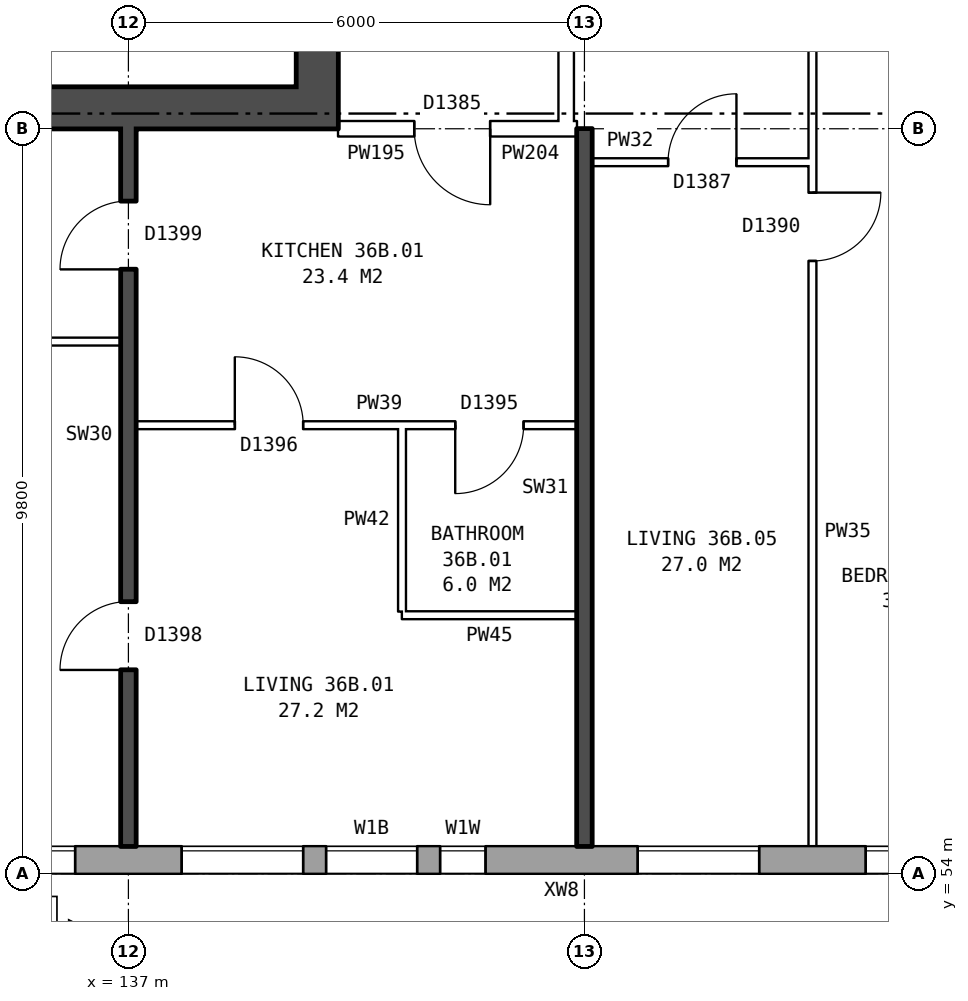
"""IFC4 building model, lengths in metres.
Left out: names, types, materials, properties, quantities, classifications, styles, units other than length and angle.
Written with IfcOpenShell. Run it as: python <this file> out.ifc"""

import sys

from ifc_helpers import new_model, si_unit, direction, frame, frame_2d, origin, place, context, subcontext, project, spatial, rectangle, extrude, element, fill, save


model = new_model("IFC4")
c1 = context("Model", 3, precision=1e-05, world=origin(), true_north=direction((0.0, 1.0)))
c2 = subcontext(c1, "Body", "Model", "MODEL_VIEW")
j1 = project(units=[si_unit("LENGTHUNIT", "METRE"), si_unit("PLANEANGLEUNIT", "RADIAN")], contexts=[c1])
p1 = place(None, origin())
s1 = spatial("IfcSite", under=j1, at=p1, CompositionType="ELEMENT")
p2 = place(p1, origin())
s2 = spatial("IfcBuilding", under=s1, at=p2, CompositionType="ELEMENT")
p3 = place(p2, frame((0.0, 0.0, 129.9)))
s3 = spatial("IfcBuildingStorey", under=s2, at=p3, CompositionType="ELEMENT", Elevation=129.9)
p4 = place(p3, frame((134.075, 54.18, 0.0), z_axis=(0.0, 0.0, 1.0), x_axis=(1.0, 0.0, 0.0)))
e1 = element("IfcWall", 1, at=p4, inside=s3, PredefinedType="STANDARD", context=c2, shape_type="SweptSolid", body=[
    extrude(rectangle(XDim=35.601, YDim=0.36, at=frame_2d((17.8, 0.0))), origin(), (0.0, 0.0, 1.0), 2.85),
])
p5 = place(p4, frame((0.625, 0.0, 0.8)))
e2 = element("IfcOpeningElement", 2, at=p5, cuts=e1, PredefinedType="OPENING", context=c2, shape_type="SweptSolid", body=[
    extrude(rectangle(XDim=1.6, YDim=1.8, at=frame_2d((0.8, 0.9))), frame((0.0, 0.19, 0.0), z_axis=(0.0, -1.0, 0.0), x_axis=(1.0, 0.0, 0.0)), (0.0, 0.0, 1.0), 0.38),
])
p6 = place(p4, frame((3.625, 0.0, 0.8)))
e3 = element("IfcOpeningElement", 3, at=p6, cuts=e1, PredefinedType="OPENING", context=c2, shape_type="SweptSolid", body=[
    extrude(rectangle(XDim=1.6, YDim=1.8, at=frame_2d((0.8, 0.9))), frame((0.0, 0.19, 0.0), z_axis=(0.0, -1.0, 0.0), x_axis=(1.0, 0.0, 0.0)), (0.0, 0.0, 1.0), 0.38),
])
p7 = place(p4, frame((5.525, 0.0, 0.8)))
e4 = element("IfcOpeningElement", 4, at=p7, cuts=e1, PredefinedType="OPENING", context=c2, shape_type="SweptSolid", body=[
    extrude(rectangle(XDim=1.2, YDim=1.8, at=frame_2d((0.6, 0.9))), frame((0.0, 0.19, 0.0), z_axis=(0.0, -1.0, 0.0), x_axis=(1.0, 0.0, 0.0)), (0.0, 0.0, 1.0), 0.38),
])
p8 = place(p4, frame((9.625, 0.0, 0.8)))
e5 = element("IfcOpeningElement", 5, at=p8, cuts=e1, PredefinedType="OPENING", context=c2, shape_type="SweptSolid", body=[
    extrude(rectangle(XDim=1.6, YDim=1.8, at=frame_2d((0.8, 0.9))), frame((0.0, 0.19, 0.0), z_axis=(0.0, -1.0, 0.0), x_axis=(1.0, 0.0, 0.0)), (0.0, 0.0, 1.0), 0.38),
])
p9 = place(p4, frame((12.625, 0.0, 0.8)))
e6 = element("IfcOpeningElement", 6, at=p9, cuts=e1, PredefinedType="OPENING", context=c2, shape_type="SweptSolid", body=[
    extrude(rectangle(XDim=1.6, YDim=1.8, at=frame_2d((0.8, 0.9))), frame((0.0, 0.19, 0.0), z_axis=(0.0, -1.0, 0.0), x_axis=(1.0, 0.0, 0.0)), (0.0, 0.0, 1.0), 0.38),
])
p10 = place(p4, frame((15.625, 0.0, 0.8)))
e7 = element("IfcOpeningElement", 7, at=p10, cuts=e1, PredefinedType="OPENING", context=c2, shape_type="SweptSolid", body=[
    extrude(rectangle(XDim=1.6, YDim=1.8, at=frame_2d((0.8, 0.9))), frame((0.0, 0.19, 0.0), z_axis=(0.0, -1.0, 0.0), x_axis=(1.0, 0.0, 0.0)), (0.0, 0.0, 1.0), 0.38),
])
p11 = place(p4, frame((18.625, 0.0, 0.8)))
e8 = element("IfcOpeningElement", 8, at=p11, cuts=e1, PredefinedType="OPENING", context=c2, shape_type="SweptSolid", body=[
    extrude(rectangle(XDim=1.6, YDim=1.8, at=frame_2d((0.8, 0.9))), frame((0.0, 0.19, 0.0), z_axis=(0.0, -1.0, 0.0), x_axis=(1.0, 0.0, 0.0)), (0.0, 0.0, 1.0), 0.38),
])
p12 = place(p4, frame((21.625, 0.0, 0.8)))
e9 = element("IfcOpeningElement", 9, at=p12, cuts=e1, PredefinedType="OPENING", context=c2, shape_type="SweptSolid", body=[
    extrude(rectangle(XDim=1.6, YDim=1.8, at=frame_2d((0.8, 0.9))), frame((0.0, 0.19, 0.0), z_axis=(0.0, -1.0, 0.0), x_axis=(1.0, 0.0, 0.0)), (0.0, 0.0, 1.0), 0.38),
])
p13 = place(p4, frame((24.625, 0.0, 0.8)))
e10 = element("IfcOpeningElement", 10, at=p13, cuts=e1, PredefinedType="OPENING", context=c2, shape_type="SweptSolid", body=[
    extrude(rectangle(XDim=1.6, YDim=1.8, at=frame_2d((0.8, 0.9))), frame((0.0, 0.19, 0.0), z_axis=(0.0, -1.0, 0.0), x_axis=(1.0, 0.0, 0.0)), (0.0, 0.0, 1.0), 0.38),
])
p14 = place(p4, frame((27.825, 0.0, 1.7)))
e11 = element("IfcOpeningElement", 11, at=p14, cuts=e1, PredefinedType="OPENING", context=c2, shape_type="SweptSolid", body=[
    extrude(rectangle(XDim=0.6, YDim=0.9, at=frame_2d((0.3, 0.45))), frame((0.0, 0.19, 0.0), z_axis=(0.0, -1.0, 0.0), x_axis=(1.0, 0.0, 0.0)), (0.0, 0.0, 1.0), 0.38),
])
p15 = place(p4, frame((30.625, 0.0, 0.8)))
e12 = element("IfcOpeningElement", 12, at=p15, cuts=e1, PredefinedType="OPENING", context=c2, shape_type="SweptSolid", body=[
    extrude(rectangle(XDim=1.6, YDim=1.8, at=frame_2d((0.8, 0.9))), frame((0.0, 0.19, 0.0), z_axis=(0.0, -1.0, 0.0), x_axis=(1.0, 0.0, 0.0)), (0.0, 0.0, 1.0), 0.38),
])
p16 = place(p4, frame((33.625, 0.0, 0.8)))
e13 = element("IfcOpeningElement", 13, at=p16, cuts=e1, PredefinedType="OPENING", context=c2, shape_type="SweptSolid", body=[
    extrude(rectangle(XDim=1.6, YDim=1.8, at=frame_2d((0.8, 0.9))), frame((0.0, 0.19, 0.0), z_axis=(0.0, -1.0, 0.0), x_axis=(1.0, 0.0, 0.0)), (0.0, 0.0, 1.0), 0.38),
])
p17 = place(p4, frame((7.025, 0.0, 1.6)))
e14 = element("IfcOpeningElement", 14, at=p17, cuts=e1, PredefinedType="OPENING", context=c2, shape_type="SweptSolid", body=[
    extrude(rectangle(XDim=0.6, YDim=0.9, at=frame_2d((0.3, 0.45))), frame((0.0, 0.19, 0.0), z_axis=(0.0, -1.0, 0.0), x_axis=(1.0, 0.0, 0.0)), (0.0, 0.0, 1.0), 0.38),
])
p18 = place(p4, frame((28.725, 0.0, 0.8)))
e15 = element("IfcOpeningElement", 15, at=p18, cuts=e1, PredefinedType="OPENING", context=c2, shape_type="SweptSolid", body=[
    extrude(rectangle(XDim=1.6, YDim=1.8, at=frame_2d((0.8, 0.9))), frame((0.0, 0.19, 0.0), z_axis=(0.0, -1.0, 0.0), x_axis=(1.0, 0.0, 0.0)), (0.0, 0.0, 1.0), 0.38),
])
p19 = place(p3, frame((139.485, 63.8, 0.0), z_axis=(0.0, 0.0, 1.0), x_axis=(0.0, 1.0, 0.0)))
e16 = element("IfcWall", 16, at=p19, inside=s3, PredefinedType="SHEAR", context=c2, shape_type="SweptSolid", body=[
    extrude(rectangle(XDim=12.4, YDim=0.55, at=frame_2d((6.2, 0.0))), origin(), (0.0, 0.0, 1.0), 2.85),
])
p20 = place(p19, frame((1.325, 0.0, 0.0)))
e17 = element("IfcOpeningElement", 17, at=p20, cuts=e16, PredefinedType="OPENING", context=c2, shape_type="SweptSolid", body=[
    extrude(rectangle(XDim=1.1, YDim=2.1, at=frame_2d((0.55, 1.05))), frame((0.0, 0.285, 0.0), z_axis=(0.0, -1.0, 0.0), x_axis=(1.0, 0.0, 0.0)), (0.0, 0.0, 1.0), 0.57),
])
p21 = place(p19, frame((3.6, 0.0, 0.0)))
e18 = element("IfcOpeningElement", 18, at=p21, cuts=e16, PredefinedType="OPENING", context=c2, shape_type="SweptSolid", body=[
    extrude(rectangle(XDim=1.1, YDim=2.1, at=frame_2d((0.55, 1.05))), frame((0.0, 0.285, 0.0), z_axis=(0.0, -1.0, 0.0), x_axis=(1.0, 0.0, 0.0)), (0.0, 0.0, 1.0), 0.57),
])
p22 = place(p19, frame((5.8, 0.0, 0.0)))
e19 = element("IfcOpeningElement", 19, at=p22, cuts=e16, PredefinedType="OPENING", context=c2, shape_type="SweptSolid", body=[
    extrude(rectangle(XDim=1.1, YDim=2.1, at=frame_2d((0.55, 1.05))), frame((0.0, 0.285, 0.0), z_axis=(0.0, -1.0, 0.0), x_axis=(1.0, 0.0, 0.0)), (0.0, 0.0, 1.0), 0.57),
])
p23 = place(p19, frame((9.9, 0.0, 0.0)))
e20 = element("IfcOpeningElement", 20, at=p23, cuts=e16, PredefinedType="OPENING", context=c2, shape_type="SweptSolid", body=[
    extrude(rectangle(XDim=1.1, YDim=2.1, at=frame_2d((0.55, 1.05))), frame((0.0, 0.285, 0.0), z_axis=(0.0, -1.0, 0.0), x_axis=(1.0, 0.0, 0.0)), (0.0, 0.0, 1.0), 0.57),
])
p24 = place(p19, frame((8.125, 0.0, 0.0)))
e21 = element("IfcOpeningElement", 21, at=p24, cuts=e16, PredefinedType="OPENING", context=c2, shape_type="SweptSolid", body=[
    extrude(rectangle(XDim=0.85, YDim=2.1, at=frame_2d((0.425, 1.05))), frame((0.0, 0.285, 0.0), z_axis=(0.0, -1.0, 0.0), x_axis=(1.0, 0.0, 0.0)), (0.0, 0.0, 1.0), 0.57),
])
p25 = place(p3, frame((139.21, 64.075, 0.0), z_axis=(0.0, 0.0, 1.0), x_axis=(-1.0, 0.0, 0.0)))
e22 = element("IfcWall", 22, at=p25, inside=s3, PredefinedType="SHEAR", context=c2, shape_type="SweptSolid", body=[
    extrude(rectangle(XDim=7.3, YDim=0.55, at=frame_2d((3.65, 0.0))), origin(), (0.0, 0.0, 1.0), 2.85),
])
p26 = place(p3, frame((142.76, 63.9, 0.0), z_axis=(0.0, 0.0, 1.0), x_axis=(0.0, 1.0, 0.0)))
e23 = element("IfcWall", 23, at=p26, inside=s3, PredefinedType="PARTITIONING", context=c2, shape_type="SweptSolid", body=[
    extrude(rectangle(XDim=12.2, YDim=0.2, at=frame_2d((6.1, 0.0))), origin(), (0.0, 0.0, 1.0), 2.85),
])
p27 = place(p26, frame((5.1, 0.0, 0.0)))
e24 = element("IfcOpeningElement", 24, at=p27, cuts=e23, PredefinedType="OPENING", context=c2, shape_type="SweptSolid", body=[
    extrude(rectangle(XDim=2.0, YDim=2.1, at=frame_2d((1.0, 1.05))), frame((0.0, 0.11, 0.0), z_axis=(0.0, -1.0, 0.0), x_axis=(1.0, 0.0, 0.0)), (0.0, 0.0, 1.0), 0.22),
])
p28 = place(p3, frame((140.6, 57.4, 0.0), z_axis=(0.0, 0.0, 1.0), x_axis=(1.0, 0.0, 0.0)))
e25 = element("IfcWall", 25, at=p28, inside=s3, PredefinedType="PARTITIONING", context=c2, shape_type="SweptSolid", body=[
    extrude(rectangle(XDim=2.3, YDim=0.1, at=frame_2d((1.15, 0.0))), origin(), (0.0, 0.0, 1.0), 2.85),
])
p29 = place(p3, frame((137.1, 59.9, 0.0), z_axis=(0.0, 0.0, 1.0), x_axis=(1.0, 0.0, 0.0)))
e26 = element("IfcWall", 26, at=p29, inside=s3, PredefinedType="PARTITIONING", context=c2, shape_type="SweptSolid", body=[
    extrude(rectangle(XDim=5.8, YDim=0.1, at=frame_2d((2.9, 0.0))), origin(), (0.0, 0.0, 1.0), 2.85),
])
p30 = place(p29, frame((1.3, 0.0, 0.0)))
e27 = element("IfcOpeningElement", 27, at=p30, cuts=e26, PredefinedType="OPENING", context=c2, shape_type="SweptSolid", body=[
    extrude(rectangle(XDim=0.9, YDim=2.1, at=frame_2d((0.45, 1.05))), frame((0.0, 0.06, 0.0), z_axis=(0.0, -1.0, 0.0), x_axis=(1.0, 0.0, 0.0)), (0.0, 0.0, 1.0), 0.12),
])
p31 = place(p29, frame((4.2, 0.0, 0.0)))
e28 = element("IfcOpeningElement", 28, at=p31, cuts=e26, PredefinedType="OPENING", context=c2, shape_type="SweptSolid", body=[
    extrude(rectangle(XDim=0.9, YDim=2.1, at=frame_2d((0.45, 1.05))), frame((0.0, 0.06, 0.0), z_axis=(0.0, -1.0, 0.0), x_axis=(1.0, 0.0, 0.0)), (0.0, 0.0, 1.0), 0.12),
])
p32 = place(p3, frame((131.36, 61.0, 0.0), z_axis=(0.0, 0.0, 1.0), x_axis=(1.0, 0.0, 0.0)))
e29 = element("IfcWall", 29, at=p32, inside=s3, PredefinedType="PARTITIONING", context=c2, shape_type="SweptSolid", body=[
    extrude(rectangle(XDim=5.54, YDim=0.1, at=frame_2d((2.77, 0.0))), origin(), (0.0, 0.0, 1.0), 2.85),
])
p33 = place(p3, frame((143.1, 63.36, 0.0), z_axis=(0.0, 0.0, 1.0), x_axis=(1.0, 0.0, 0.0)))
e30 = element("IfcWall", 30, at=p33, inside=s3, PredefinedType="PARTITIONING", context=c2, shape_type="SweptSolid", body=[
    extrude(rectangle(XDim=2.9, YDim=0.1, at=frame_2d((1.45, 0.0))), origin(), (0.0, 0.0, 1.0), 2.85),
])
p34 = place(p33, frame((1.0, 0.0, 0.0)))
e31 = element("IfcOpeningElement", 31, at=p34, cuts=e30, PredefinedType="OPENING", context=c2, shape_type="SweptSolid", body=[
    extrude(rectangle(XDim=0.9, YDim=2.1, at=frame_2d((0.45, 1.05))), frame((0.0, 0.06, 0.0), z_axis=(0.0, -1.0, 0.0), x_axis=(1.0, 0.0, 0.0)), (0.0, 0.0, 1.0), 0.12),
])
p35 = place(p3, frame((139.76, 63.8, 0.0), z_axis=(0.0, 0.0, 1.0), x_axis=(1.0, 0.0, 0.0)))
e32 = element("IfcWall", 32, at=p35, inside=s3, PredefinedType="PARTITIONING", context=c2, shape_type="SweptSolid", body=[
    extrude(rectangle(XDim=3.0, YDim=0.2, at=frame_2d((1.5, 0.0))), origin(), (0.0, 0.0, 1.0), 2.85),
])
p36 = place(p35, frame((1.0, 0.0, 0.0)))
e33 = element("IfcOpeningElement", 33, at=p36, cuts=e32, PredefinedType="OPENING", context=c2, shape_type="SweptSolid", body=[
    extrude(rectangle(XDim=1.0, YDim=2.1, at=frame_2d((0.5, 1.05))), frame((0.0, 0.11, 0.0), z_axis=(0.0, -1.0, 0.0), x_axis=(1.0, 0.0, 0.0)), (0.0, 0.0, 1.0), 0.22),
])
p37 = place(p3, frame((142.76, 63.8, 0.0), z_axis=(0.0, 0.0, 1.0), x_axis=(1.0, 0.0, 0.0)))
e34 = element("IfcWall", 34, at=p37, inside=s3, PredefinedType="PARTITIONING", context=c2, shape_type="SweptSolid", body=[
    extrude(rectangle(XDim=0.14, YDim=0.2, at=frame_2d((0.07, 0.0))), origin(), (0.0, 0.0, 1.0), 2.85),
])
p38 = place(p3, frame((137.0, 54.36, 0.0), z_axis=(0.0, 0.0, 1.0), x_axis=(0.0, 1.0, 0.0)))
e35 = element("IfcWall", 35, at=p38, inside=s3, PredefinedType="SOLIDWALL", context=c2, shape_type="SweptSolid", body=[
    extrude(rectangle(XDim=9.44, YDim=0.2, at=frame_2d((4.72, 0.0))), origin(), (0.0, 0.0, 1.0), 2.85),
])
p39 = place(p38, frame((2.32, 0.0, 0.0)))
e36 = element("IfcOpeningElement", 36, at=p39, cuts=e35, PredefinedType="OPENING", context=c2, shape_type="SweptSolid", body=[
    extrude(rectangle(XDim=0.9, YDim=2.1, at=frame_2d((0.45, 1.05))), frame((0.0, 0.11, 0.0), z_axis=(0.0, -1.0, 0.0), x_axis=(1.0, 0.0, 0.0)), (0.0, 0.0, 1.0), 0.22),
])
p40 = place(p38, frame((7.59, 0.0, 0.0)))
e37 = element("IfcOpeningElement", 37, at=p40, cuts=e35, PredefinedType="OPENING", context=c2, shape_type="SweptSolid", body=[
    extrude(rectangle(XDim=0.9, YDim=2.1, at=frame_2d((0.45, 1.05))), frame((0.0, 0.11, 0.0), z_axis=(0.0, -1.0, 0.0), x_axis=(1.0, 0.0, 0.0)), (0.0, 0.0, 1.0), 0.22),
])
p41 = place(p3, frame((140.6, 57.45, 0.0), z_axis=(0.0, 0.0, 1.0), x_axis=(0.0, 1.0, 0.0)))
e38 = element("IfcWall", 38, at=p41, inside=s3, PredefinedType="PARTITIONING", context=c2, shape_type="SweptSolid", body=[
    extrude(rectangle(XDim=2.4, YDim=0.1, at=frame_2d((1.2, 0.0))), origin(), (0.0, 0.0, 1.0), 2.85),
])
p42 = place(p3, frame((143.0, 54.36, 0.0), z_axis=(0.0, 0.0, 1.0), x_axis=(0.0, 1.0, 0.0)))
e39 = element("IfcWall", 39, at=p42, inside=s3, PredefinedType="SOLIDWALL", context=c2, shape_type="SweptSolid", body=[
    extrude(rectangle(XDim=9.44, YDim=0.2, at=frame_2d((4.72, 0.0))), origin(), (0.0, 0.0, 1.0), 2.85),
])
p43 = place(p3, frame((146.0, 54.36, 0.0), z_axis=(0.0, 0.0, 1.0), x_axis=(0.0, 1.0, 0.0)))
e40 = element("IfcWall", 40, at=p43, inside=s3, PredefinedType="PARTITIONING", context=c2, shape_type="SweptSolid", body=[
    extrude(rectangle(XDim=14.34, YDim=0.1, at=frame_2d((7.17, 0.0))), origin(), (0.0, 0.0, 1.0), 2.85),
])
p44 = place(p43, frame((7.7, 0.0, 0.0)))
e41 = element("IfcOpeningElement", 41, at=p44, cuts=e40, PredefinedType="OPENING", context=c2, shape_type="SweptSolid", body=[
    extrude(rectangle(XDim=0.9, YDim=2.1, at=frame_2d((0.45, 1.05))), frame((0.0, 0.06, 0.0), z_axis=(0.0, -1.0, 0.0), x_axis=(1.0, 0.0, 0.0)), (0.0, 0.0, 1.0), 0.12),
])
p45 = place(p43, frame((13.04, 0.0, 0.0)))
e42 = element("IfcOpeningElement", 42, at=p45, cuts=e40, PredefinedType="OPENING", context=c2, shape_type="SweptSolid", body=[
    extrude(rectangle(XDim=0.9, YDim=2.1, at=frame_2d((0.45, 1.05))), frame((0.0, 0.06, 0.0), z_axis=(0.0, -1.0, 0.0), x_axis=(1.0, 0.0, 0.0)), (0.0, 0.0, 1.0), 0.12),
])
p46 = place(p5, origin())
e43 = element("IfcWindow", 43, at=p46, inside=s3, PartitioningType="SINGLE_PANEL", PredefinedType="WINDOW", context=c2, shape_type="SweptSolid", body=[
    extrude(rectangle(XDim=1.6, YDim=1.8, at=frame_2d((0.8, 0.9))), frame((0.0, 0.15, 0.0), z_axis=(0.0, -1.0, 0.0), x_axis=(1.0, 0.0, 0.0)), (0.0, 0.0, 1.0), 0.06),
])
fill(e2, e43)
p47 = place(p6, origin())
e44 = element("IfcWindow", 44, at=p47, inside=s3, PartitioningType="SINGLE_PANEL", PredefinedType="WINDOW", context=c2, shape_type="SweptSolid", body=[
    extrude(rectangle(XDim=1.6, YDim=1.8, at=frame_2d((0.8, 0.9))), frame((0.0, 0.15, 0.0), z_axis=(0.0, -1.0, 0.0), x_axis=(1.0, 0.0, 0.0)), (0.0, 0.0, 1.0), 0.06),
])
fill(e3, e44)
p48 = place(p7, origin())
e45 = element("IfcWindow", 45, at=p48, inside=s3, PartitioningType="SINGLE_PANEL", PredefinedType="WINDOW", context=c2, shape_type="SweptSolid", body=[
    extrude(rectangle(XDim=1.2, YDim=1.8, at=frame_2d((0.6, 0.9))), frame((0.0, 0.15, 0.0), z_axis=(0.0, -1.0, 0.0), x_axis=(1.0, 0.0, 0.0)), (0.0, 0.0, 1.0), 0.06),
])
fill(e4, e45)
p49 = place(p8, origin())
e46 = element("IfcWindow", 46, at=p49, inside=s3, PartitioningType="SINGLE_PANEL", PredefinedType="WINDOW", context=c2, shape_type="SweptSolid", body=[
    extrude(rectangle(XDim=1.6, YDim=1.8, at=frame_2d((0.8, 0.9))), frame((0.0, 0.15, 0.0), z_axis=(0.0, -1.0, 0.0), x_axis=(1.0, 0.0, 0.0)), (0.0, 0.0, 1.0), 0.06),
])
fill(e5, e46)
p50 = place(p9, origin())
e47 = element("IfcWindow", 47, at=p50, inside=s3, PartitioningType="SINGLE_PANEL", PredefinedType="WINDOW", context=c2, shape_type="SweptSolid", body=[
    extrude(rectangle(XDim=1.6, YDim=1.8, at=frame_2d((0.8, 0.9))), frame((0.0, 0.15, 0.0), z_axis=(0.0, -1.0, 0.0), x_axis=(1.0, 0.0, 0.0)), (0.0, 0.0, 1.0), 0.06),
])
fill(e6, e47)
p51 = place(p39, origin())
e48 = element("IfcDoor", 48, at=p51, inside=s3, OperationType="SINGLE_SWING_LEFT", PredefinedType="DOOR", context=c2, shape_type="SweptSolid", body=[
    extrude(rectangle(XDim=0.9, YDim=2.1, at=frame_2d((0.45, 1.05))), frame((0.0, 0.025, 0.0), z_axis=(0.0, -1.0, 0.0), x_axis=(1.0, 0.0, 0.0)), (0.0, 0.0, 1.0), 0.05),
])
fill(e36, e48)
p52 = place(p40, origin())
e49 = element("IfcDoor", 49, at=p52, inside=s3, OperationType="SINGLE_SWING_LEFT", PredefinedType="DOOR", context=c2, shape_type="SweptSolid", body=[
    extrude(rectangle(XDim=0.9, YDim=2.1, at=frame_2d((0.45, 1.05))), frame((0.0, 0.025, 0.0), z_axis=(0.0, -1.0, 0.0), x_axis=(1.0, 0.0, 0.0)), (0.0, 0.0, 1.0), 0.05),
])
fill(e37, e49)
p53 = place(p36, frame((1.0, 0.0, 0.0), z_axis=(0.0, 0.0, 1.0), x_axis=(-1.0, 0.0, 0.0)))
e50 = element("IfcDoor", 50, at=p53, inside=s3, OperationType="SINGLE_SWING_LEFT", PredefinedType="DOOR", context=c2, shape_type="SweptSolid", body=[
    extrude(rectangle(XDim=1.0, YDim=2.1, at=frame_2d((0.5, 1.05))), frame((0.0, 0.025, 0.0), z_axis=(0.0, -1.0, 0.0), x_axis=(1.0, 0.0, 0.0)), (0.0, 0.0, 1.0), 0.05),
])
fill(e33, e50)
p54 = place(p30, origin())
e51 = element("IfcDoor", 51, at=p54, inside=s3, OperationType="SINGLE_SWING_LEFT", PredefinedType="DOOR", context=c2, shape_type="SweptSolid", body=[
    extrude(rectangle(XDim=0.9, YDim=2.1, at=frame_2d((0.45, 1.05))), frame((0.0, 0.025, 0.0), z_axis=(0.0, -1.0, 0.0), x_axis=(1.0, 0.0, 0.0)), (0.0, 0.0, 1.0), 0.05),
])
fill(e27, e51)
p55 = place(p31, frame((0.9, 0.0, 0.0), z_axis=(0.0, 0.0, 1.0), x_axis=(-1.0, 0.0, 0.0)))
e52 = element("IfcDoor", 52, at=p55, inside=s3, OperationType="SINGLE_SWING_RIGHT", PredefinedType="DOOR", context=c2, shape_type="SweptSolid", body=[
    extrude(rectangle(XDim=0.9, YDim=2.1, at=frame_2d((0.45, 1.05))), frame((0.0, 0.025, 0.0), z_axis=(0.0, -1.0, 0.0), x_axis=(1.0, 0.0, 0.0)), (0.0, 0.0, 1.0), 0.05),
])
fill(e28, e52)
p56 = place(p44, frame((0.9, 0.0, 0.0), z_axis=(0.0, 0.0, 1.0), x_axis=(-1.0, 0.0, 0.0)))
e53 = element("IfcDoor", 53, at=p56, inside=s3, OperationType="SINGLE_SWING_LEFT", PredefinedType="DOOR", context=c2, shape_type="SweptSolid", body=[
    extrude(rectangle(XDim=0.9, YDim=2.1, at=frame_2d((0.45, 1.05))), frame((0.0, 0.025, 0.0), z_axis=(0.0, -1.0, 0.0), x_axis=(1.0, 0.0, 0.0)), (0.0, 0.0, 1.0), 0.05),
])
fill(e41, e53)
p57 = place(p34, origin())
e54 = element("IfcDoor", 54, at=p57, inside=s3, OperationType="SINGLE_SWING_RIGHT", PredefinedType="DOOR", context=c2, shape_type="SweptSolid", body=[
    extrude(rectangle(XDim=0.9, YDim=2.1, at=frame_2d((0.45, 1.05))), frame((0.0, 0.025, 0.0), z_axis=(0.0, -1.0, 0.0), x_axis=(1.0, 0.0, 0.0)), (0.0, 0.0, 1.0), 0.05),
])
fill(e31, e54)
p58 = place(p17, origin())
e55 = element("IfcWindow", 55, at=p58, inside=s3, PartitioningType="SINGLE_PANEL", PredefinedType="WINDOW", context=c2, shape_type="SweptSolid", body=[
    extrude(rectangle(XDim=0.6, YDim=0.9, at=frame_2d((0.3, 0.45))), frame((0.0, 0.15, 0.0), z_axis=(0.0, -1.0, 0.0), x_axis=(1.0, 0.0, 0.0)), (0.0, 0.0, 1.0), 0.06),
])
fill(e14, e55)
save(model, sys.argv[1])
